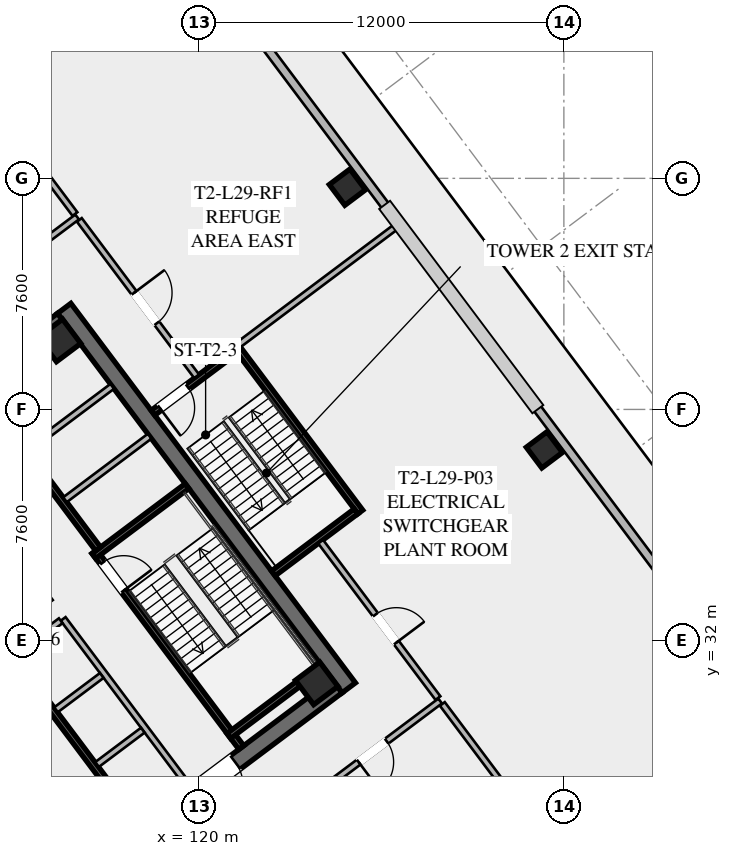
"""IFC4 building model, lengths in metres.
Left out: names, types, materials, properties, quantities, classifications, styles, units other than length and angle.
Written with IfcOpenShell. Run it as: python <this file> out.ifc"""

import sys

from ifc_helpers import new_model, si_unit, direction, frame, frame_2d, origin, origin_2d, place, context, subcontext, project, spatial, rectangle, hollow_rectangle, extrude, element, fill, save


model = new_model("IFC4")
c1 = context("Model", 3, precision=1e-05, world=origin(), true_north=direction((0.0, 1.0)))
c2 = subcontext(c1, "Body", "Model", "MODEL_VIEW")
j1 = project(units=[si_unit("LENGTHUNIT", "METRE"), si_unit("PLANEANGLEUNIT", "RADIAN")], contexts=[c1])
p1 = place(None, origin())
s1 = spatial("IfcSite", under=j1, at=p1, CompositionType="ELEMENT")
p2 = place(p1, origin())
s2 = spatial("IfcBuilding", under=s1, at=p2, CompositionType="ELEMENT")
p3 = place(p2, frame((0.0, 0.0, 109.8)))
s3 = spatial("IfcBuildingStorey", under=s2, at=p3, CompositionType="ELEMENT", Elevation=109.8)
p4 = place(p3, frame((115.564, 42.923, 0.0), z_axis=(0.0, 0.0, 1.0), x_axis=(0.600005007985, -0.799996243986, 0.0)))
e1 = element("IfcWall", 1, at=p4, inside=s3, PredefinedType="SHEAR", context=c2, shape_type="SweptSolid", body=[
    extrude(rectangle(XDim=15.6, YDim=0.55, at=frame_2d((7.8, 0.0))), origin(), (0.0, 0.0, 1.0), 4.6),
])
p5 = place(p3, frame((124.539, 30.498, 0.0), z_axis=(0.0, 0.0, 1.0), x_axis=(-0.799998054672, -0.600002593761, 0.0)))
e2 = element("IfcWall", 2, at=p5, inside=s3, PredefinedType="SHEAR", context=c2, shape_type="SweptSolid", body=[
    extrude(rectangle(XDim=15.06, YDim=0.55, at=frame_2d((7.53, 0.0))), origin(), (0.0, 0.0, 1.0), 4.6),
])
p6 = place(p5, frame((9.23, 0.0, 0.0)))
e3 = element("IfcOpeningElement", 3, at=p6, cuts=e2, PredefinedType="OPENING", context=c2, shape_type="SweptSolid", body=[
    extrude(rectangle(XDim=1.25, YDim=2.25, at=frame_2d((0.625, 1.125))), frame((0.0, 0.285, 0.0), z_axis=(0.0, -1.0, 0.0), x_axis=(1.0, 0.0, 0.0)), (0.0, 0.0, 1.0), 0.57),
])
p7 = place(p5, frame((4.18, 0.0, 0.0)))
e4 = element("IfcOpeningElement", 4, at=p7, cuts=e2, PredefinedType="OPENING", context=c2, shape_type="SweptSolid", body=[
    extrude(rectangle(XDim=1.25, YDim=2.25, at=frame_2d((0.625, 1.125))), frame((0.0, 0.285, 0.0), z_axis=(0.0, -1.0, 0.0), x_axis=(1.0, 0.0, 0.0)), (0.0, 0.0, 1.0), 0.57),
])
p8 = place(p3, frame((103.461, 33.502, 0.0), z_axis=(0.0, 0.0, 1.0), x_axis=(0.799998054672, 0.600002593761, 0.0)))
e5 = element("IfcWall", 5, at=p8, inside=s3, PredefinedType="SHEAR", context=c2, shape_type="SweptSolid", body=[
    extrude(rectangle(XDim=15.06, YDim=0.55, at=frame_2d((7.53, 0.0))), origin(), (0.0, 0.0, 1.0), 4.6),
])
p9 = place(p8, frame((4.58, 0.0, 0.0)))
e6 = element("IfcOpeningElement", 6, at=p9, cuts=e5, PredefinedType="OPENING", context=c2, shape_type="SweptSolid", body=[
    extrude(rectangle(XDim=1.25, YDim=2.25, at=frame_2d((0.625, 1.125))), frame((0.0, 0.285, 0.0), z_axis=(0.0, -1.0, 0.0), x_axis=(1.0, 0.0, 0.0)), (0.0, 0.0, 1.0), 0.57),
])
p10 = place(p8, frame((9.63, 0.0, 0.0)))
e7 = element("IfcOpeningElement", 7, at=p10, cuts=e5, PredefinedType="OPENING", context=c2, shape_type="SweptSolid", body=[
    extrude(rectangle(XDim=1.25, YDim=2.25, at=frame_2d((0.625, 1.125))), frame((0.0, 0.285, 0.0), z_axis=(0.0, -1.0, 0.0), x_axis=(1.0, 0.0, 0.0)), (0.0, 0.0, 1.0), 0.57),
])
for number, where, z_axis, x_axis in (
    (8, (123.87, 30.59, 0.0), (0.0, 0.0, 1.0), (0.8, 0.6, 0.0)),
    (9, (115.41, 41.87, 0.0), (0.0, 0.0, 1.0), (0.8, 0.6, 0.0)),
):
    element("IfcColumn", number, at=place(p3, frame(where, z_axis=z_axis, x_axis=x_axis)), inside=s3, PredefinedType="COLUMN", context=c2, shape_type="SweptSolid", body=[
        extrude(hollow_rectangle(XDim=1.0, YDim=1.0, WallThickness=0.04, at=origin_2d()), origin(), (0.0, 0.0, 1.0), 4.42),
    ])
for number, where, z_axis, x_axis in (
    (10, (131.36, 38.27, -0.295), (0.0, 0.0, 1.0), (0.8, 0.6, 0.0)),
    (11, (124.88, 46.91, -0.295), (0.0, 0.0, 1.0), (0.8, 0.6, 0.0)),
):
    element("IfcColumn", number, at=place(p3, frame(where, z_axis=z_axis, x_axis=x_axis)), inside=s3, PredefinedType="COLUMN", context=c2, shape_type="SweptSolid", body=[
        extrude(hollow_rectangle(XDim=0.85, YDim=0.85, WallThickness=0.035, at=origin_2d()), origin(), (0.0, 0.0, 1.0), 4.715),
    ])
for number, where, z_axis, x_axis in (
    (12, (90.328, 37.096, 0.0), (0.0, 0.0, 1.0), (0.8, 0.6, 0.0)),
    (13, (119.096, 55.672, 0.0), (0.0, 0.0, 1.0), (0.6, -0.8, 0.0)),
):
    element("IfcWall", number, at=place(p3, frame(where, z_axis=z_axis, x_axis=x_axis)), inside=s3, PredefinedType="SOLIDWALL", context=c2, shape_type="SweptSolid", body=[
        extrude(rectangle(XDim=31.76, YDim=0.28, at=frame_2d((15.88, 0.0))), origin(), (0.0, 0.0, 1.0), 4.42),
    ])
p11 = place(p3, frame((116.56, 34.92, 0.0), z_axis=(0.0, 0.0, 1.0), x_axis=(0.59999029481, -0.8000072788, 0.0)))
e14 = element("IfcWall", 14, at=p11, inside=s3, PredefinedType="SHEAR", context=c2, shape_type="SweptSolid", body=[
    extrude(rectangle(XDim=8.05, YDim=0.2, at=frame_2d((4.025, 0.0))), origin(), (0.0, 0.0, 1.0), 4.42),
])
p12 = place(p11, frame((0.45, 0.0, 0.0)))
e15 = element("IfcOpeningElement", 15, at=p12, cuts=e14, PredefinedType="OPENING", context=c2, shape_type="SweptSolid", body=[
    extrude(rectangle(XDim=1.15, YDim=2.2, at=frame_2d((0.575, 1.1))), frame((0.0, 0.11, 0.0), z_axis=(0.0, -1.0, 0.0), x_axis=(1.0, 0.0, 0.0)), (0.0, 0.0, 1.0), 0.22),
])
for number, where, z_axis, x_axis in (
    (16, (116.54, 34.78, 0.0), (0.0, 0.0, 1.0), (0.8, 0.6, 0.0)),
    (17, (120.98, 28.86, 0.0), (0.0, 0.0, 1.0), (0.8, 0.6, 0.0)),
):
    element("IfcWall", number, at=place(p3, frame(where, z_axis=z_axis, x_axis=x_axis)), inside=s3, PredefinedType="SHEAR", context=c2, shape_type="SweptSolid", body=[
        extrude(rectangle(XDim=3.83, YDim=0.2, at=frame_2d((1.915, 0.0))), origin(), (0.0, 0.0, 1.0), 4.42),
    ])
p13 = place(p3, frame((117.998, 25.936, 0.0), z_axis=(0.0, 0.0, 1.0), x_axis=(-0.600002693989, 0.799997979501, 0.0)))
e18 = element("IfcWall", 18, at=p13, inside=s3, PredefinedType="SHEAR", context=c2, shape_type="SweptSolid", body=[
    extrude(rectangle(XDim=14.5, YDim=0.2, at=frame_2d((7.25, 0.0))), origin(), (0.0, 0.0, 1.0), 4.42),
])
p14 = place(p3, frame((115.19, 23.83, 0.0), z_axis=(0.0, 0.0, 1.0), x_axis=(-0.599993943644, 0.800004542231, 0.0)))
e19 = element("IfcWall", 19, at=p14, inside=s3, PredefinedType="SHEAR", context=c2, shape_type="SweptSolid", body=[
    extrude(rectangle(XDim=6.45, YDim=0.2, at=frame_2d((3.225, 0.0))), origin(), (0.0, 0.0, 1.0), 4.42),
])
p15 = place(p14, frame((4.875, 0.0, 0.0)))
e20 = element("IfcOpeningElement", 20, at=p15, cuts=e19, PredefinedType="OPENING", context=c2, shape_type="SweptSolid", body=[
    extrude(rectangle(XDim=1.3, YDim=2.25, at=frame_2d((0.65, 1.125))), frame((0.0, 0.11, 0.0), z_axis=(0.0, -1.0, 0.0), x_axis=(1.0, 0.0, 0.0)), (0.0, 0.0, 1.0), 0.22),
])
p16 = place(p14, frame((2.875, 0.0, 0.0)))
e21 = element("IfcOpeningElement", 21, at=p16, cuts=e19, PredefinedType="OPENING", context=c2, shape_type="SweptSolid", body=[
    extrude(rectangle(XDim=1.3, YDim=2.25, at=frame_2d((0.65, 1.125))), frame((0.0, 0.11, 0.0), z_axis=(0.0, -1.0, 0.0), x_axis=(1.0, 0.0, 0.0)), (0.0, 0.0, 1.0), 0.22),
])
p17 = place(p14, frame((0.675, 0.0, 0.0)))
e22 = element("IfcOpeningElement", 22, at=p17, cuts=e19, PredefinedType="OPENING", context=c2, shape_type="SweptSolid", body=[
    extrude(rectangle(XDim=1.3, YDim=2.25, at=frame_2d((0.65, 1.125))), frame((0.0, 0.11, 0.0), z_axis=(0.0, -1.0, 0.0), x_axis=(1.0, 0.0, 0.0)), (0.0, 0.0, 1.0), 0.22),
])
p18 = place(p3, frame((112.81, 40.17, 0.0), z_axis=(0.0, 0.0, 1.0), x_axis=(0.599993943644, -0.800004542231, 0.0)))
e23 = element("IfcWall", 23, at=p18, inside=s3, PredefinedType="SHEAR", context=c2, shape_type="SweptSolid", body=[
    extrude(rectangle(XDim=6.45, YDim=0.2, at=frame_2d((3.225, 0.0))), origin(), (0.0, 0.0, 1.0), 4.42),
])
for number, where, z_axis, x_axis in (
    (24, (115.59, 36.63, 0.0), (0.0, 0.0, 1.0), (0.8, 0.6, 0.0)),
    (25, (114.36, 38.27, 0.0), (0.0, 0.0, 1.0), (0.8, 0.6, 0.0)),
):
    element("IfcWall", number, at=place(p3, frame(where, z_axis=z_axis, x_axis=x_axis)), inside=s3, PredefinedType="SOLIDWALL", context=c2, shape_type="SweptSolid", body=[
        extrude(rectangle(XDim=3.48, YDim=0.2, at=frame_2d((1.74, 0.0))), origin(), (0.0, 0.0, 1.0), 4.42),
    ])
p19 = place(p3, frame((119.67, 27.19, 0.0), z_axis=(0.0, 0.0, 1.0), x_axis=(-0.599988677396, 0.800008491828, 0.0)))
e26 = element("IfcWall", 26, at=p19, inside=s3, PredefinedType="SOLIDWALL", context=c2, shape_type="SweptSolid", body=[
    extrude(rectangle(XDim=6.9, YDim=0.2, at=frame_2d((3.45, 0.0))), origin(), (0.0, 0.0, 1.0), 4.42),
])
p20 = place(p3, frame((116.646, 27.922, 0.0), z_axis=(0.0, 0.0, 1.0), x_axis=(0.8, 0.6, 0.0)))
e27 = element("IfcWall", 27, at=p20, inside=s3, PredefinedType="SOLIDWALL", context=c2, shape_type="SweptSolid", body=[
    extrude(rectangle(XDim=1.88, YDim=0.2, at=frame_2d((0.94, 0.0))), origin(), (0.0, 0.0, 1.0), 4.42),
])
p21 = place(p3, frame((115.296, 29.722, 0.0), z_axis=(0.0, 0.0, 1.0), x_axis=(0.799984418148, 0.600020775241, 0.0)))
e28 = element("IfcWall", 28, at=p21, inside=s3, PredefinedType="SOLIDWALL", context=c2, shape_type="SweptSolid", body=[
    extrude(rectangle(XDim=1.88, YDim=0.2, at=frame_2d((0.94, 0.0))), origin(), (0.0, 0.0, 1.0), 4.42),
])
p22 = place(p3, frame((113.946, 31.522, 0.0), z_axis=(0.0, 0.0, 1.0), x_axis=(0.8, 0.6, 0.0)))
e29 = element("IfcWall", 29, at=p22, inside=s3, PredefinedType="SOLIDWALL", context=c2, shape_type="SweptSolid", body=[
    extrude(rectangle(XDim=1.88, YDim=0.2, at=frame_2d((0.94, 0.0))), origin(), (0.0, 0.0, 1.0), 4.42),
])
p23 = place(p3, frame((115.11, 33.27, 0.0), z_axis=(0.0, 0.0, 1.0), x_axis=(-0.600011322243, 0.799991508192, 0.0)))
e30 = element("IfcWall", 30, at=p23, inside=s3, PredefinedType="SOLIDWALL", context=c2, shape_type="SweptSolid", body=[
    extrude(rectangle(XDim=6.9, YDim=0.2, at=frame_2d((3.45, 0.0))), origin(), (0.0, 0.0, 1.0), 4.42),
])
p24 = place(p23, frame((0.575, 0.0, 0.0)))
e31 = element("IfcOpeningElement", 31, at=p24, cuts=e30, PredefinedType="OPENING", context=c2, shape_type="SweptSolid", body=[
    extrude(rectangle(XDim=1.1, YDim=2.2, at=frame_2d((0.55, 1.1))), frame((0.0, 0.11, 0.0), z_axis=(0.0, -1.0, 0.0), x_axis=(1.0, 0.0, 0.0)), (0.0, 0.0, 1.0), 0.22),
])
p25 = place(p23, frame((2.825, 0.0, 0.0)))
e32 = element("IfcOpeningElement", 32, at=p25, cuts=e30, PredefinedType="OPENING", context=c2, shape_type="SweptSolid", body=[
    extrude(rectangle(XDim=1.1, YDim=2.2, at=frame_2d((0.55, 1.1))), frame((0.0, 0.11, 0.0), z_axis=(0.0, -1.0, 0.0), x_axis=(1.0, 0.0, 0.0)), (0.0, 0.0, 1.0), 0.22),
])
p26 = place(p23, frame((5.075, 0.0, 0.0)))
e33 = element("IfcOpeningElement", 33, at=p26, cuts=e30, PredefinedType="OPENING", context=c2, shape_type="SweptSolid", body=[
    extrude(rectangle(XDim=1.1, YDim=2.2, at=frame_2d((0.55, 1.1))), frame((0.0, 0.11, 0.0), z_axis=(0.0, -1.0, 0.0), x_axis=(1.0, 0.0, 0.0)), (0.0, 0.0, 1.0), 0.22),
])
p27 = place(p3, frame((125.304, 36.228, 0.0), z_axis=(0.0, 0.0, 1.0), x_axis=(-0.59998851072, 0.800008616831, 0.0)))
e34 = element("IfcWall", 34, at=p27, inside=s3, PredefinedType="SHEAR", context=c2, shape_type="SweptSolid", body=[
    extrude(rectangle(XDim=6.8, YDim=0.2, at=frame_2d((3.4, 0.0))), origin(), (0.0, 0.0, 1.0), 4.42),
])
p28 = place(p3, frame((121.204, 41.528, 0.0), z_axis=(0.0, 0.0, 1.0), x_axis=(-0.800017232136, -0.599977023131, 0.0)))
e35 = element("IfcWall", 35, at=p28, inside=s3, PredefinedType="SHEAR", context=c2, shape_type="SweptSolid", body=[
    extrude(rectangle(XDim=3.4, YDim=0.2, at=frame_2d((1.7, 0.0))), origin(), (0.0, 0.0, 1.0), 4.42),
])
p29 = place(p28, frame((1.975, 0.0, 0.0)))
e36 = element("IfcOpeningElement", 36, at=p29, cuts=e35, PredefinedType="OPENING", context=c2, shape_type="SweptSolid", body=[
    extrude(rectangle(XDim=1.15, YDim=2.2, at=frame_2d((0.575, 1.1))), frame((0.0, 0.11, 0.0), z_axis=(0.0, -1.0, 0.0), x_axis=(1.0, 0.0, 0.0)), (0.0, 0.0, 1.0), 0.22),
])
p30 = place(p3, frame((122.444, 34.208, 0.0), z_axis=(0.0, 0.0, 1.0), x_axis=(0.79999138319, 0.600011488909, 0.0)))
e37 = element("IfcWall", 37, at=p30, inside=s3, PredefinedType="SHEAR", context=c2, shape_type="SweptSolid", body=[
    extrude(rectangle(XDim=3.4, YDim=0.2, at=frame_2d((1.7, 0.0))), origin(), (0.0, 0.0, 1.0), 4.42),
])
p31 = place(p3, frame((100.07, 33.99, 0.0), z_axis=(0.0, 0.0, 1.0), x_axis=(0.8, 0.6, 0.0)))
e38 = element("IfcWall", 38, at=p31, inside=s3, PredefinedType="SOLIDWALL", context=c2, shape_type="SweptSolid", body=[
    extrude(rectangle(XDim=19.9, YDim=0.2, at=frame_2d((9.95, 0.0))), origin(), (0.0, 0.0, 1.0), 3.531),
])
p32 = place(p31, frame((2.2, 0.0, 0.0)))
e39 = element("IfcOpeningElement", 39, at=p32, cuts=e38, PredefinedType="OPENING", context=c2, shape_type="SweptSolid", body=[
    extrude(rectangle(XDim=1.15, YDim=2.2, at=frame_2d((0.575, 1.1))), frame((0.0, 0.11, 0.0), z_axis=(0.0, -1.0, 0.0), x_axis=(1.0, 0.0, 0.0)), (0.0, 0.0, 1.0), 0.22),
])
p33 = place(p3, frame((127.93, 30.01, 0.0), z_axis=(0.0, 0.0, 1.0), x_axis=(-0.8, -0.6, 0.0)))
e40 = element("IfcWall", 40, at=p33, inside=s3, PredefinedType="SOLIDWALL", context=c2, shape_type="SweptSolid", body=[
    extrude(rectangle(XDim=19.9, YDim=0.2, at=frame_2d((9.95, 0.0))), origin(), (0.0, 0.0, 1.0), 3.531),
])
p34 = place(p33, frame((2.2, 0.0, 0.0)))
e41 = element("IfcOpeningElement", 41, at=p34, cuts=e40, PredefinedType="OPENING", context=c2, shape_type="SweptSolid", body=[
    extrude(rectangle(XDim=1.15, YDim=2.2, at=frame_2d((0.575, 1.1))), frame((0.0, 0.11, 0.0), z_axis=(0.0, -1.0, 0.0), x_axis=(1.0, 0.0, 0.0)), (0.0, 0.0, 1.0), 0.22),
])
p35 = place(p3, frame((116.062, 45.834, 0.0), z_axis=(0.0, 0.0, 1.0), x_axis=(0.599987849816, -0.800009112494, 0.0)))
e42 = element("IfcWall", 42, at=p35, inside=s3, PredefinedType="SOLIDWALL", context=c2, shape_type="SweptSolid", body=[
    extrude(rectangle(XDim=6.43, YDim=0.2, at=frame_2d((3.215, 0.0))), origin(), (0.0, 0.0, 1.0), 3.531),
])
p36 = place(p35, frame((3.0, 0.0, 0.0)))
e43 = element("IfcOpeningElement", 43, at=p36, cuts=e42, PredefinedType="OPENING", context=c2, shape_type="SweptSolid", body=[
    extrude(rectangle(XDim=1.25, YDim=2.25, at=frame_2d((0.625, 1.125))), frame((0.0, 0.11, 0.0), z_axis=(0.0, -1.0, 0.0), x_axis=(1.0, 0.0, 0.0)), (0.0, 0.0, 1.0), 0.22),
])
p37 = place(p3, frame((124.0, 35.25, 0.0), z_axis=(0.0, 0.0, 1.0), x_axis=(0.599987849816, -0.800009112494, 0.0)))
e44 = element("IfcWall", 44, at=p37, inside=s3, PredefinedType="SOLIDWALL", context=c2, shape_type="SweptSolid", body=[
    extrude(rectangle(XDim=6.43, YDim=0.2, at=frame_2d((3.215, 0.0))), origin(), (0.0, 0.0, 1.0), 3.531),
])
p38 = place(p37, frame((3.0, 0.0, 0.0)))
e45 = element("IfcOpeningElement", 45, at=p38, cuts=e44, PredefinedType="OPENING", context=c2, shape_type="SweptSolid", body=[
    extrude(rectangle(XDim=1.15, YDim=2.2, at=frame_2d((0.575, 1.1))), frame((0.0, 0.11, 0.0), z_axis=(0.0, -1.0, 0.0), x_axis=(1.0, 0.0, 0.0)), (0.0, 0.0, 1.0), 0.22),
])
for number, where, z_axis, x_axis in (
    (46, (115.918, 46.026, 0.0), (0.0, 0.0, 1.0), (-0.6, 0.8, 0.0)),
    (47, (128.002, 29.914, 0.0), (0.0, 0.0, 1.0), (0.6, -0.8, 0.0)),
):
    element("IfcWall", number, at=place(p3, frame(where, z_axis=z_axis, x_axis=x_axis)), inside=s3, PredefinedType="SOLIDWALL", context=c2, shape_type="SweptSolid", body=[
        extrude(rectangle(XDim=8.21, YDim=0.2, at=frame_2d((4.105, 0.0))), origin(), (0.0, 0.0, 1.0), 3.531),
    ])
p39 = place(p3, frame((121.304, 41.728, 0.0), z_axis=(0.0, 0.0, 1.0), x_axis=(0.800004438899, 0.599994081423, 0.0)))
e48 = element("IfcWall", 48, at=p39, inside=s3, PredefinedType="SOLIDWALL", context=c2, shape_type="SweptSolid", body=[
    extrude(rectangle(XDim=6.6, YDim=0.2, at=frame_2d((3.3, 0.0))), origin(), (0.0, 0.0, 1.0), 3.531),
])
p40 = place(p7, origin())
e49 = element("IfcDoor", 49, at=p40, inside=s3, OperationType="SINGLE_SWING_RIGHT", PredefinedType="DOOR", context=c2, shape_type="SweptSolid", body=[
    extrude(rectangle(XDim=1.25, YDim=2.25, at=frame_2d((0.625, 1.125))), frame((0.0, 0.025, 0.0), z_axis=(0.0, -1.0, 0.0), x_axis=(1.0, 0.0, 0.0)), (0.0, 0.0, 1.0), 0.05),
])
fill(e4, e49)
p41 = place(p12, origin())
e50 = element("IfcDoor", 50, at=p41, inside=s3, OperationType="SINGLE_SWING_RIGHT", PredefinedType="DOOR", context=c2, shape_type="SweptSolid", body=[
    extrude(rectangle(XDim=1.15, YDim=2.2, at=frame_2d((0.575, 1.1))), frame((0.0, 0.025, 0.0), z_axis=(0.0, -1.0, 0.0), x_axis=(1.0, 0.0, 0.0)), (0.0, 0.0, 1.0), 0.05),
])
fill(e15, e50)
p42 = place(p29, origin())
e51 = element("IfcDoor", 51, at=p42, inside=s3, OperationType="SINGLE_SWING_RIGHT", PredefinedType="DOOR", context=c2, shape_type="SweptSolid", body=[
    extrude(rectangle(XDim=1.15, YDim=2.2, at=frame_2d((0.575, 1.1))), frame((0.0, 0.025, 0.0), z_axis=(0.0, -1.0, 0.0), x_axis=(1.0, 0.0, 0.0)), (0.0, 0.0, 1.0), 0.05),
])
fill(e36, e51)
p43 = place(p34, origin())
e52 = element("IfcDoor", 52, at=p43, inside=s3, OperationType="SINGLE_SWING_RIGHT", PredefinedType="DOOR", context=c2, shape_type="SweptSolid", body=[
    extrude(rectangle(XDim=1.15, YDim=2.2, at=frame_2d((0.575, 1.1))), frame((0.0, 0.025, 0.0), z_axis=(0.0, -1.0, 0.0), x_axis=(1.0, 0.0, 0.0)), (0.0, 0.0, 1.0), 0.05),
])
fill(e41, e52)
p44 = place(p36, origin())
e53 = element("IfcDoor", 53, at=p44, inside=s3, OperationType="SINGLE_SWING_LEFT", PredefinedType="DOOR", context=c2, shape_type="SweptSolid", body=[
    extrude(rectangle(XDim=1.25, YDim=2.25, at=frame_2d((0.625, 1.125))), frame((0.0, 0.025, 0.0), z_axis=(0.0, -1.0, 0.0), x_axis=(1.0, 0.0, 0.0)), (0.0, 0.0, 1.0), 0.05),
])
fill(e43, e53)
p45 = place(p38, origin())
e54 = element("IfcDoor", 54, at=p45, inside=s3, OperationType="SINGLE_SWING_RIGHT", PredefinedType="DOOR", context=c2, shape_type="SweptSolid", body=[
    extrude(rectangle(XDim=1.15, YDim=2.2, at=frame_2d((0.575, 1.1))), frame((0.0, 0.025, 0.0), z_axis=(0.0, -1.0, 0.0), x_axis=(1.0, 0.0, 0.0)), (0.0, 0.0, 1.0), 0.05),
])
fill(e45, e54)
save(model, sys.argv[1])
